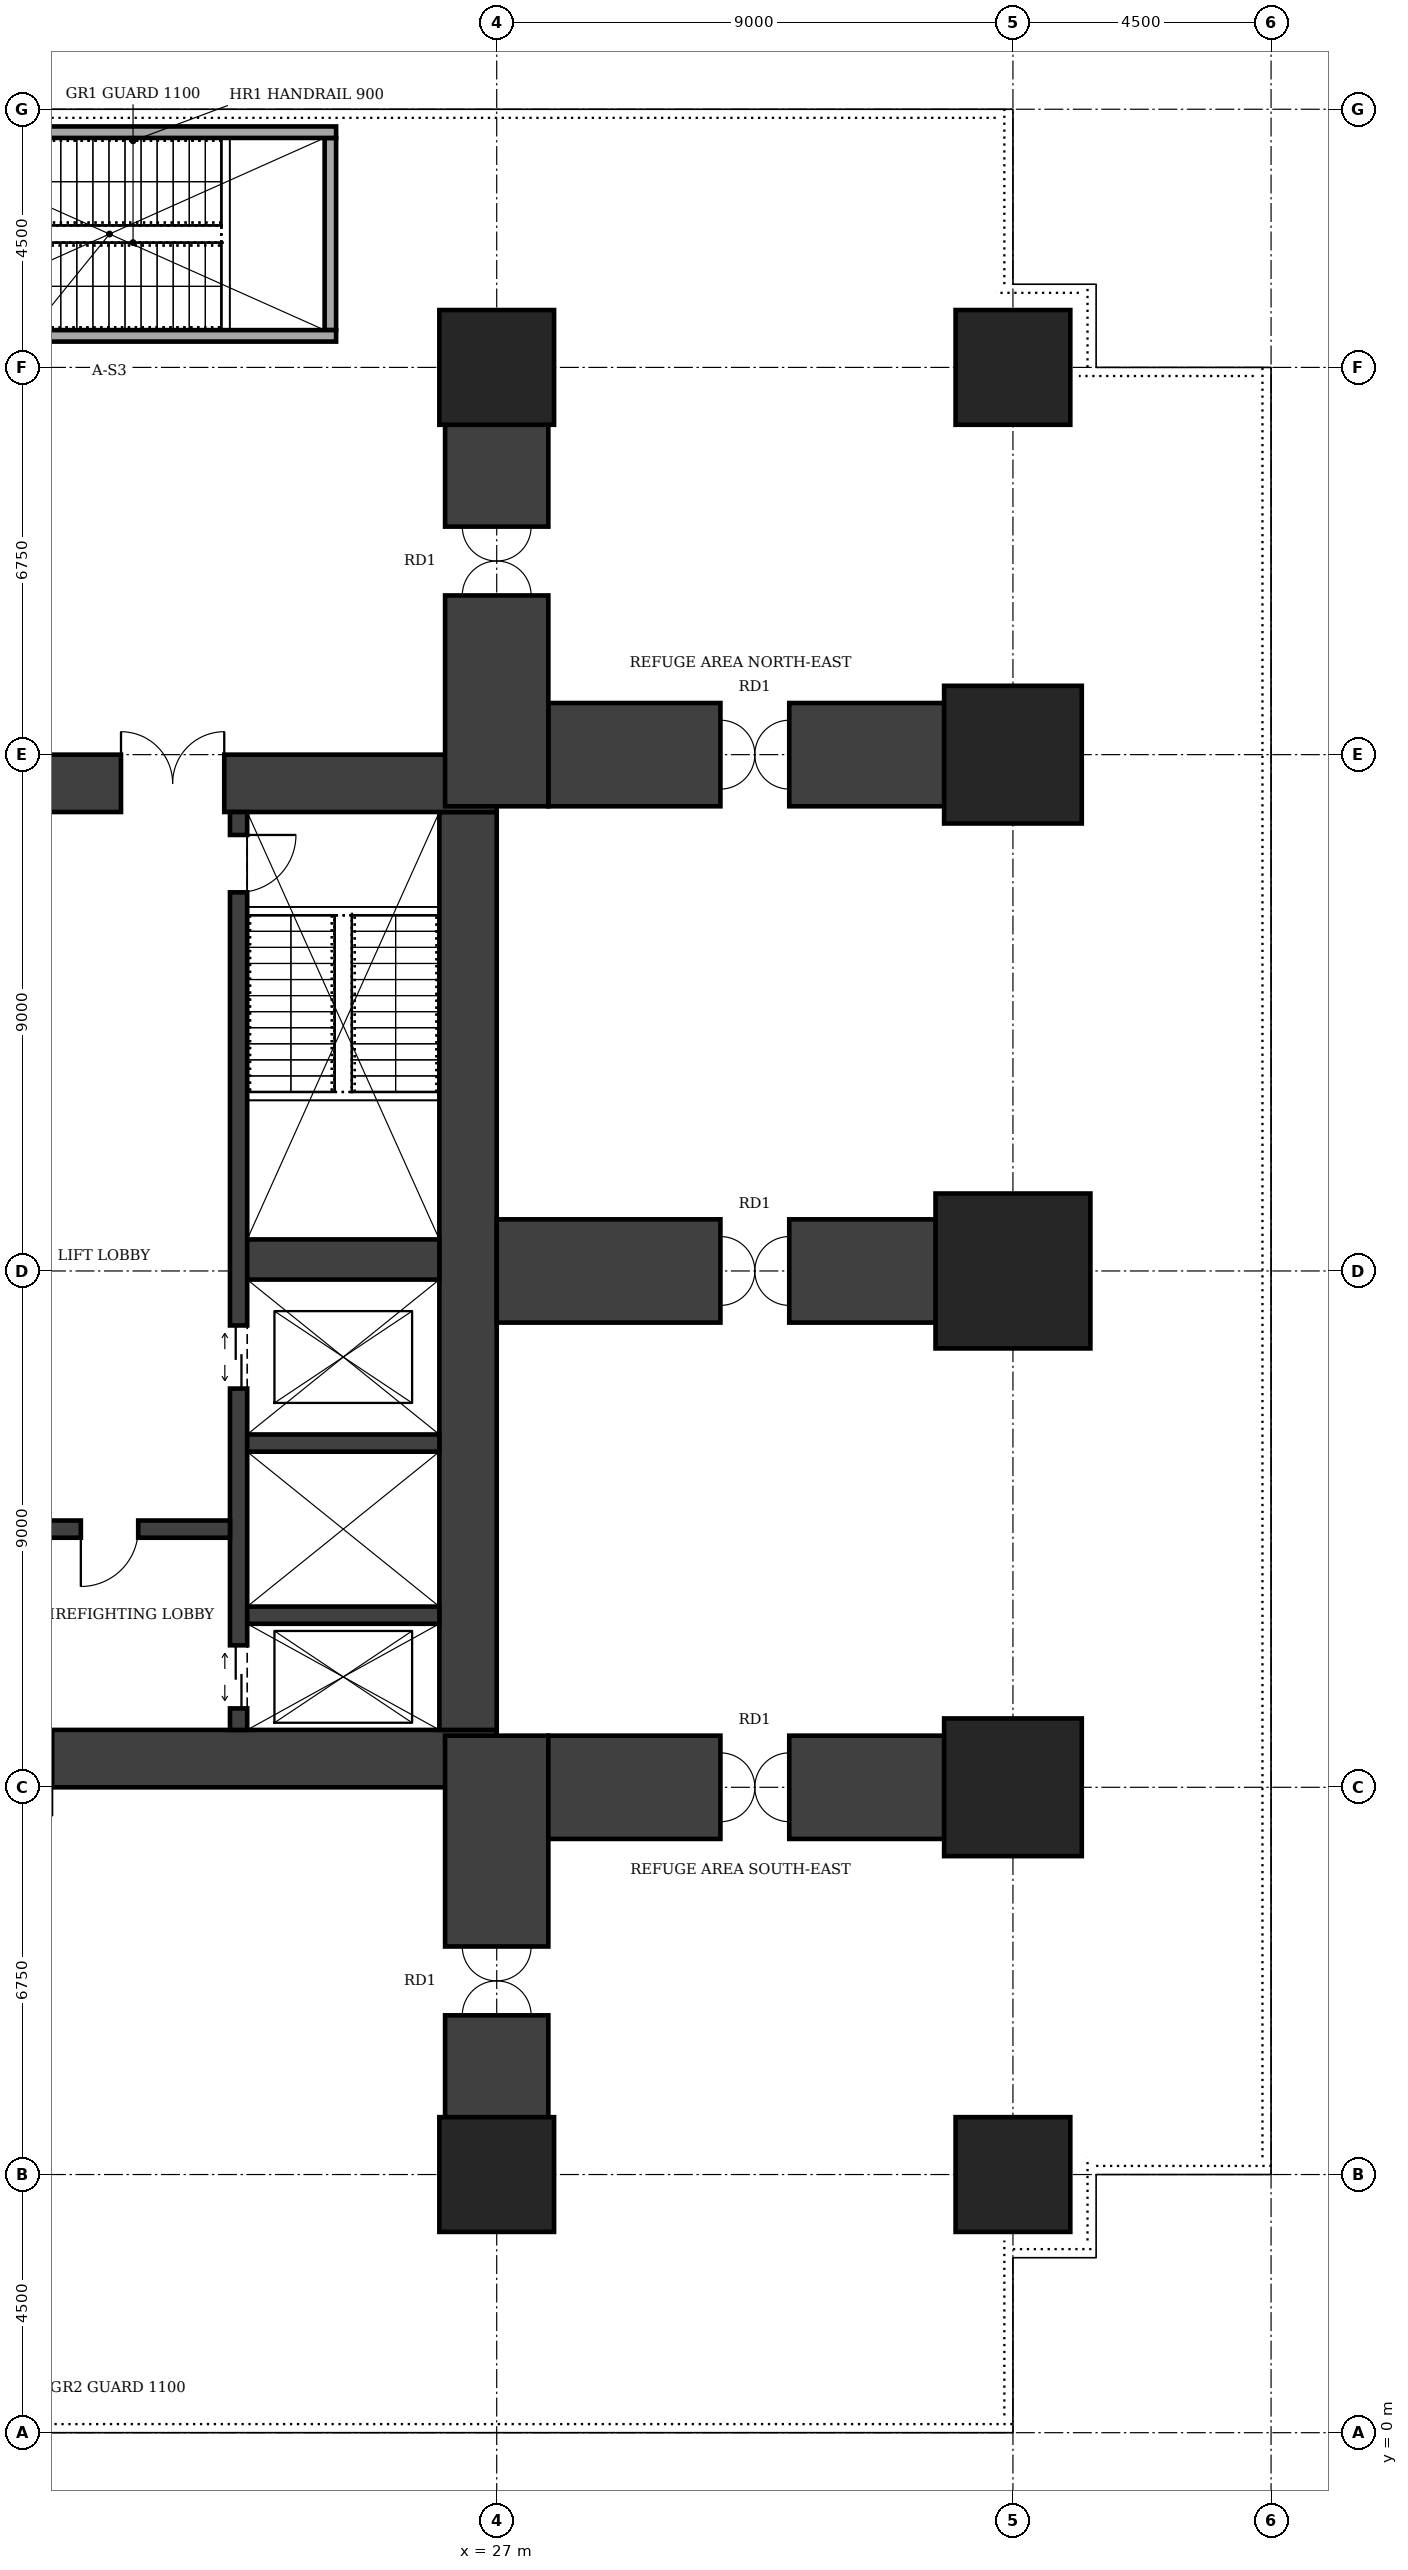
"""IFC4 building model, lengths in metres.
Left out: names, types, materials, properties, quantities, classifications, styles, units other than length and angle.
Written with IfcOpenShell. Run it as: python <this file> out.ifc"""

import sys

from ifc_helpers import new_model, si_unit, direction, frame, frame_2d, origin, origin_2d, place, context, subcontext, project, spatial, rectangle, extrude, element, fill, save


model = new_model("IFC4")
c1 = context("Model", 3, precision=1e-05, world=origin(), true_north=direction((0.0, 1.0)))
c2 = subcontext(c1, "Body", "Model", "MODEL_VIEW")
j1 = project(units=[si_unit("LENGTHUNIT", "METRE"), si_unit("PLANEANGLEUNIT", "RADIAN")], contexts=[c1])
p1 = place(None, origin())
s1 = spatial("IfcSite", under=j1, at=p1, CompositionType="ELEMENT")
p2 = place(p1, origin())
s2 = spatial("IfcBuilding", under=s1, at=p2, CompositionType="ELEMENT")
p3 = place(p2, frame((0.0, 0.0, 77.0)))
s3 = spatial("IfcBuildingStorey", under=s2, at=p3, CompositionType="ELEMENT", Elevation=77.0)
p4 = place(p3, frame((13.5, 11.75, 0.0), z_axis=(0.0, 0.0, 1.0), x_axis=(1.0, 0.0, 0.0)))
e1 = element("IfcWall", 1, at=p4, inside=s3, PredefinedType="SHEAR", context=c2, shape_type="SweptSolid", body=[
    extrude(rectangle(XDim=13.5, YDim=1.0, at=frame_2d((6.75, 0.0))), origin(), (0.0, 0.0, 1.0), 8.0),
])
p5 = place(p4, frame((4.75, 0.0, 0.0)))
e2 = element("IfcOpeningElement", 2, at=p5, cuts=e1, PredefinedType="OPENING", context=c2, shape_type="SweptSolid", body=[
    extrude(rectangle(XDim=1.0, YDim=2.1, at=frame_2d((0.5, 1.05))), frame((0.0, 0.51, 0.0), z_axis=(0.0, -1.0, 0.0), x_axis=(1.0, 0.0, 0.0)), (0.0, 0.0, 1.0), 1.02),
])
p6 = place(p3, frame((26.5, 12.25, 0.0), z_axis=(0.0, 0.0, 1.0), x_axis=(0.0, 1.0, 0.0)))
e3 = element("IfcWall", 3, at=p6, inside=s3, PredefinedType="SHEAR", context=c2, shape_type="SweptSolid", body=[
    extrude(rectangle(XDim=16.0, YDim=1.0, at=frame_2d((8.0, 0.0))), origin(), (0.0, 0.0, 1.0), 8.0),
])
p7 = place(p3, frame((27.0, 28.75, 0.0), z_axis=(0.0, 0.0, 1.0), x_axis=(-1.0, 0.0, 0.0)))
e4 = element("IfcWall", 4, at=p7, inside=s3, PredefinedType="SHEAR", context=c2, shape_type="SweptSolid", body=[
    extrude(rectangle(XDim=13.5, YDim=1.0, at=frame_2d((6.75, 0.0))), origin(), (0.0, 0.0, 1.0), 8.0),
])
p8 = place(p7, frame((4.75, 0.0, 0.0)))
e5 = element("IfcOpeningElement", 5, at=p8, cuts=e4, PredefinedType="OPENING", context=c2, shape_type="SweptSolid", body=[
    extrude(rectangle(XDim=1.8, YDim=2.1, at=frame_2d((0.9, 1.05))), frame((0.0, 0.51, 0.0), z_axis=(0.0, -1.0, 0.0), x_axis=(1.0, 0.0, 0.0)), (0.0, 0.0, 1.0), 1.02),
])
p9 = place(p3, frame((22.5, 12.25, 0.0), z_axis=(0.0, 0.0, 1.0), x_axis=(0.0, 1.0, 0.0)))
e6 = element("IfcWall", 6, at=p9, inside=s3, PredefinedType="SHEAR", context=c2, shape_type="SweptSolid", body=[
    extrude(rectangle(XDim=16.0, YDim=0.3, at=frame_2d((8.0, 0.0))), origin(), (0.0, 0.0, 1.0), 8.0),
])
p10 = place(p9, frame((14.6, 0.0, 0.0)))
e7 = element("IfcOpeningElement", 7, at=p10, cuts=e6, PredefinedType="OPENING", context=c2, shape_type="SweptSolid", body=[
    extrude(rectangle(XDim=1.0, YDim=2.1, at=frame_2d((0.5, 1.05))), frame((0.0, 0.16, 0.0), z_axis=(0.0, -1.0, 0.0), x_axis=(1.0, 0.0, 0.0)), (0.0, 0.0, 1.0), 0.32),
])
p11 = place(p9, frame((0.375, 0.0, 0.0)))
e8 = element("IfcOpeningElement", 8, at=p11, cuts=e6, PredefinedType="OPENING", context=c2, shape_type="SweptSolid", body=[
    extrude(rectangle(XDim=1.1, YDim=2.1, at=frame_2d((0.55, 1.05))), frame((0.0, 0.16, 0.0), z_axis=(0.0, -1.0, 0.0), x_axis=(1.0, 0.0, 0.0)), (0.0, 0.0, 1.0), 0.32),
])
p12 = place(p9, frame((5.95, 0.0, 0.0)))
e9 = element("IfcOpeningElement", 9, at=p12, cuts=e6, PredefinedType="OPENING", context=c2, shape_type="SweptSolid", body=[
    extrude(rectangle(XDim=1.1, YDim=2.1, at=frame_2d((0.55, 1.05))), frame((0.0, 0.16, 0.0), z_axis=(0.0, -1.0, 0.0), x_axis=(1.0, 0.0, 0.0)), (0.0, 0.0, 1.0), 0.32),
])
p13 = place(p3, frame((18.15, 15.75, 0.0), z_axis=(0.0, 0.0, 1.0), x_axis=(1.0, 0.0, 0.0)))
e10 = element("IfcWall", 10, at=p13, inside=s3, PredefinedType="SHEAR", context=c2, shape_type="SweptSolid", body=[
    extrude(rectangle(XDim=4.2, YDim=0.3, at=frame_2d((2.1, 0.0))), origin(), (0.0, 0.0, 1.0), 8.0),
])
p14 = place(p13, frame((1.6, 0.0, 0.0)))
e11 = element("IfcOpeningElement", 11, at=p14, cuts=e10, PredefinedType="OPENING", context=c2, shape_type="SweptSolid", body=[
    extrude(rectangle(XDim=1.0, YDim=2.1, at=frame_2d((0.5, 1.05))), frame((0.0, 0.16, 0.0), z_axis=(0.0, -1.0, 0.0), x_axis=(1.0, 0.0, 0.0)), (0.0, 0.0, 1.0), 0.32),
])
for number, where, z_axis, x_axis in (
    (12, (22.65, 14.25, 0.0), (0.0, 0.0, 1.0), (1.0, 0.0, 0.0)),
    (13, (22.65, 17.25, 0.0), (0.0, 0.0, 1.0), (1.0, 0.0, 0.0)),
):
    element("IfcWall", number, at=place(p3, frame(where, z_axis=z_axis, x_axis=x_axis)), inside=s3, PredefinedType="SHEAR", context=c2, shape_type="SweptSolid", body=[
        extrude(rectangle(XDim=3.35, YDim=0.3, at=frame_2d((1.675, 0.0))), origin(), (0.0, 0.0, 1.0), 8.0),
    ])
p15 = place(p3, frame((22.65, 20.45, 0.0), z_axis=(0.0, 0.0, 1.0), x_axis=(1.0, 0.0, 0.0)))
e14 = element("IfcWall", 14, at=p15, inside=s3, PredefinedType="SHEAR", context=c2, shape_type="SweptSolid", body=[
    extrude(rectangle(XDim=3.35, YDim=0.7, at=frame_2d((1.675, 0.0))), origin(), (0.0, 0.0, 1.0), 8.0),
])
for number, where, z_axis, x_axis in (
    (15, (27.0, 4.5, 0.0), (0.0, 0.0, 1.0), (1.0, 0.0, 0.0)),
    (16, (36.0, 4.5, 0.0), (0.0, 0.0, 1.0), (1.0, 0.0, 0.0)),
):
    element("IfcColumn", number, at=place(p3, frame(where, z_axis=z_axis, x_axis=x_axis)), inside=s3, PredefinedType="COLUMN", context=c2, shape_type="SweptSolid", body=[
        extrude(rectangle(XDim=2.0, YDim=2.0, at=origin_2d()), origin(), (0.0, 0.0, 1.0), 8.0),
    ])
p16 = place(p3, frame((36.0, 11.25, 0.0), z_axis=(0.0, 0.0, 1.0), x_axis=(1.0, 0.0, 0.0)))
e17 = element("IfcColumn", 17, at=p16, inside=s3, PredefinedType="COLUMN", context=c2, shape_type="SweptSolid", body=[
    extrude(rectangle(XDim=2.4, YDim=2.4, at=origin_2d()), origin(), (0.0, 0.0, 1.0), 8.0),
])
p17 = place(p3, frame((36.0, 20.25, 0.0), z_axis=(0.0, 0.0, 1.0), x_axis=(1.0, 0.0, 0.0)))
e18 = element("IfcColumn", 18, at=p17, inside=s3, PredefinedType="COLUMN", context=c2, shape_type="SweptSolid", body=[
    extrude(rectangle(XDim=2.7, YDim=2.7, at=origin_2d()), origin(), (0.0, 0.0, 1.0), 8.0),
])
p18 = place(p3, frame((36.0, 29.25, 0.0), z_axis=(0.0, 0.0, 1.0), x_axis=(1.0, 0.0, 0.0)))
e19 = element("IfcColumn", 19, at=p18, inside=s3, PredefinedType="COLUMN", context=c2, shape_type="SweptSolid", body=[
    extrude(rectangle(XDim=2.4, YDim=2.4, at=origin_2d()), origin(), (0.0, 0.0, 1.0), 8.0),
])
for number, where, z_axis, x_axis in (
    (20, (27.0, 36.0, 0.0), (0.0, 0.0, 1.0), (1.0, 0.0, 0.0)),
    (21, (36.0, 36.0, 0.0), (0.0, 0.0, 1.0), (1.0, 0.0, 0.0)),
):
    element("IfcColumn", number, at=place(p3, frame(where, z_axis=z_axis, x_axis=x_axis)), inside=s3, PredefinedType="COLUMN", context=c2, shape_type="SweptSolid", body=[
        extrude(rectangle(XDim=2.0, YDim=2.0, at=origin_2d()), origin(), (0.0, 0.0, 1.0), 8.0),
    ])
p19 = place(p3, frame((27.0, 4.5, 0.0), z_axis=(0.0, 0.0, 1.0), x_axis=(0.0, 1.0, 0.0)))
e22 = element("IfcWall", 22, at=p19, inside=s3, PredefinedType="SHEAR", context=c2, shape_type="SweptSolid", body=[
    extrude(rectangle(XDim=7.65, YDim=1.8, at=frame_2d((3.825, 0.0))), origin(), (0.0, 0.0, 1.0), 8.0),
])
p20 = place(p19, frame((2.775, 0.0, 0.0)))
e23 = element("IfcOpeningElement", 23, at=p20, cuts=e22, PredefinedType="OPENING", context=c2, shape_type="SweptSolid", body=[
    extrude(rectangle(XDim=1.2, YDim=2.1, at=frame_2d((0.6, 1.05))), frame((0.0, 0.91, 0.0), z_axis=(0.0, -1.0, 0.0), x_axis=(1.0, 0.0, 0.0)), (0.0, 0.0, 1.0), 1.82),
])
p21 = place(p3, frame((27.0, 28.35, 0.0), z_axis=(0.0, 0.0, 1.0), x_axis=(0.0, 1.0, 0.0)))
e24 = element("IfcWall", 24, at=p21, inside=s3, PredefinedType="SHEAR", context=c2, shape_type="SweptSolid", body=[
    extrude(rectangle(XDim=7.65, YDim=1.8, at=frame_2d((3.825, 0.0))), origin(), (0.0, 0.0, 1.0), 8.0),
])
p22 = place(p21, frame((3.675, 0.0, 0.0)))
e25 = element("IfcOpeningElement", 25, at=p22, cuts=e24, PredefinedType="OPENING", context=c2, shape_type="SweptSolid", body=[
    extrude(rectangle(XDim=1.2, YDim=2.1, at=frame_2d((0.6, 1.05))), frame((0.0, 0.91, 0.0), z_axis=(0.0, -1.0, 0.0), x_axis=(1.0, 0.0, 0.0)), (0.0, 0.0, 1.0), 1.82),
])
p23 = place(p3, frame((27.0, 20.25, 0.0), z_axis=(0.0, 0.0, 1.0), x_axis=(1.0, 0.0, 0.0)))
e26 = element("IfcWall", 26, at=p23, inside=s3, PredefinedType="SHEAR", context=c2, shape_type="SweptSolid", body=[
    extrude(rectangle(XDim=9.0, YDim=1.8, at=frame_2d((4.5, 0.0))), origin(), (0.0, 0.0, 1.0), 8.0),
])
p24 = place(p23, frame((3.9, 0.0, 0.0)))
e27 = element("IfcOpeningElement", 27, at=p24, cuts=e26, PredefinedType="OPENING", context=c2, shape_type="SweptSolid", body=[
    extrude(rectangle(XDim=1.2, YDim=2.1, at=frame_2d((0.6, 1.05))), frame((0.0, 0.91, 0.0), z_axis=(0.0, -1.0, 0.0), x_axis=(1.0, 0.0, 0.0)), (0.0, 0.0, 1.0), 1.82),
])
p25 = place(p3, frame((27.9, 11.25, 0.0), z_axis=(0.0, 0.0, 1.0), x_axis=(1.0, 0.0, 0.0)))
e28 = element("IfcWall", 28, at=p25, inside=s3, PredefinedType="SHEAR", context=c2, shape_type="SweptSolid", body=[
    extrude(rectangle(XDim=8.1, YDim=1.8, at=frame_2d((4.05, 0.0))), origin(), (0.0, 0.0, 1.0), 8.0),
])
p26 = place(p25, frame((3.0, 0.0, 0.0)))
e29 = element("IfcOpeningElement", 29, at=p26, cuts=e28, PredefinedType="OPENING", context=c2, shape_type="SweptSolid", body=[
    extrude(rectangle(XDim=1.2, YDim=2.1, at=frame_2d((0.6, 1.05))), frame((0.0, 0.91, 0.0), z_axis=(0.0, -1.0, 0.0), x_axis=(1.0, 0.0, 0.0)), (0.0, 0.0, 1.0), 1.82),
])
p27 = place(p3, frame((27.9, 29.25, 0.0), z_axis=(0.0, 0.0, 1.0), x_axis=(1.0, 0.0, 0.0)))
e30 = element("IfcWall", 30, at=p27, inside=s3, PredefinedType="SHEAR", context=c2, shape_type="SweptSolid", body=[
    extrude(rectangle(XDim=8.1, YDim=1.8, at=frame_2d((4.05, 0.0))), origin(), (0.0, 0.0, 1.0), 8.0),
])
p28 = place(p27, frame((3.0, 0.0, 0.0)))
e31 = element("IfcOpeningElement", 31, at=p28, cuts=e30, PredefinedType="OPENING", context=c2, shape_type="SweptSolid", body=[
    extrude(rectangle(XDim=1.2, YDim=2.1, at=frame_2d((0.6, 1.05))), frame((0.0, 0.91, 0.0), z_axis=(0.0, -1.0, 0.0), x_axis=(1.0, 0.0, 0.0)), (0.0, 0.0, 1.0), 1.82),
])
for number, where, z_axis, x_axis in (
    (32, (16.3, 36.55, 0.0), (0.0, 0.0, 1.0), (1.0, 0.0, 0.0)),
    (33, (16.3, 40.1, 0.0), (0.0, 0.0, 1.0), (1.0, 0.0, 0.0)),
):
    element("IfcWall", number, at=place(p3, frame(where, z_axis=z_axis, x_axis=x_axis)), inside=s3, PredefinedType="SOLIDWALL", context=c2, shape_type="SweptSolid", body=[
        extrude(rectangle(XDim=7.9, YDim=0.2, at=frame_2d((3.95, 0.0))), origin(), (0.0, 0.0, 1.0), 7.75),
    ])
p29 = place(p3, frame((24.1, 36.65, 0.0), z_axis=(0.0, 0.0, 1.0), x_axis=(0.0, 1.0, 0.0)))
e34 = element("IfcWall", 34, at=p29, inside=s3, PredefinedType="SOLIDWALL", context=c2, shape_type="SweptSolid", body=[
    extrude(rectangle(XDim=3.35, YDim=0.2, at=frame_2d((1.675, 0.0))), origin(), (0.0, 0.0, 1.0), 7.75),
])
p30 = place(p8, frame((1.8, 0.0, 0.0), z_axis=(0.0, 0.0, 1.0), x_axis=(-1.0, 0.0, 0.0)))
e35 = element("IfcDoor", 35, at=p30, inside=s3, OperationType="DOUBLE_DOOR_SINGLE_SWING", PredefinedType="DOOR", context=c2, shape_type="SweptSolid", body=[
    extrude(rectangle(XDim=1.8, YDim=2.1, at=frame_2d((0.9, 1.05))), frame((0.0, 0.025, 0.0), z_axis=(0.0, -1.0, 0.0), x_axis=(1.0, 0.0, 0.0)), (0.0, 0.0, 1.0), 0.05),
])
fill(e5, e35)
p31 = place(p14, frame((1.0, 0.0, 0.0), z_axis=(0.0, 0.0, 1.0), x_axis=(-1.0, 0.0, 0.0)))
e36 = element("IfcDoor", 36, at=p31, inside=s3, OperationType="SINGLE_SWING_RIGHT", PredefinedType="DOOR", context=c2, shape_type="SweptSolid", body=[
    extrude(rectangle(XDim=1.0, YDim=2.1, at=frame_2d((0.5, 1.05))), frame((0.0, 0.025, 0.0), z_axis=(0.0, -1.0, 0.0), x_axis=(1.0, 0.0, 0.0)), (0.0, 0.0, 1.0), 0.05),
])
fill(e11, e36)
p32 = place(p10, frame((1.0, 0.0, 0.0), z_axis=(0.0, 0.0, 1.0), x_axis=(-1.0, 0.0, 0.0)))
e37 = element("IfcDoor", 37, at=p32, inside=s3, OperationType="SINGLE_SWING_LEFT", PredefinedType="DOOR", context=c2, shape_type="SweptSolid", body=[
    extrude(rectangle(XDim=1.0, YDim=2.1, at=frame_2d((0.5, 1.05))), frame((0.0, 0.025, 0.0), z_axis=(0.0, -1.0, 0.0), x_axis=(1.0, 0.0, 0.0)), (0.0, 0.0, 1.0), 0.05),
])
fill(e7, e37)
p33 = place(p11, origin())
e38 = element("IfcDoor", 38, at=p33, inside=s3, OperationType="DOUBLE_DOOR_SLIDING", PredefinedType="DOOR", context=c2, shape_type="SweptSolid", body=[
    extrude(rectangle(XDim=1.1, YDim=2.1, at=frame_2d((0.55, 1.05))), frame((0.0, 0.025, 0.0), z_axis=(0.0, -1.0, 0.0), x_axis=(1.0, 0.0, 0.0)), (0.0, 0.0, 1.0), 0.05),
])
fill(e8, e38)
p34 = place(p12, origin())
e39 = element("IfcDoor", 39, at=p34, inside=s3, OperationType="DOUBLE_DOOR_SLIDING", PredefinedType="DOOR", context=c2, shape_type="SweptSolid", body=[
    extrude(rectangle(XDim=1.1, YDim=2.1, at=frame_2d((0.55, 1.05))), frame((0.0, 0.025, 0.0), z_axis=(0.0, -1.0, 0.0), x_axis=(1.0, 0.0, 0.0)), (0.0, 0.0, 1.0), 0.05),
])
fill(e9, e39)
p35 = place(p20, origin())
e40 = element("IfcDoor", 40, at=p35, inside=s3, OperationType="DOUBLE_DOOR_DOUBLE_SWING", PredefinedType="DOOR", context=c2, shape_type="SweptSolid", body=[
    extrude(rectangle(XDim=1.2, YDim=2.1, at=frame_2d((0.6, 1.05))), frame((0.0, 0.025, 0.0), z_axis=(0.0, -1.0, 0.0), x_axis=(1.0, 0.0, 0.0)), (0.0, 0.0, 1.0), 0.05),
])
fill(e23, e40)
p36 = place(p22, origin())
e41 = element("IfcDoor", 41, at=p36, inside=s3, OperationType="DOUBLE_DOOR_DOUBLE_SWING", PredefinedType="DOOR", context=c2, shape_type="SweptSolid", body=[
    extrude(rectangle(XDim=1.2, YDim=2.1, at=frame_2d((0.6, 1.05))), frame((0.0, 0.025, 0.0), z_axis=(0.0, -1.0, 0.0), x_axis=(1.0, 0.0, 0.0)), (0.0, 0.0, 1.0), 0.05),
])
fill(e25, e41)
p37 = place(p24, origin())
e42 = element("IfcDoor", 42, at=p37, inside=s3, OperationType="DOUBLE_DOOR_DOUBLE_SWING", PredefinedType="DOOR", context=c2, shape_type="SweptSolid", body=[
    extrude(rectangle(XDim=1.2, YDim=2.1, at=frame_2d((0.6, 1.05))), frame((0.0, 0.025, 0.0), z_axis=(0.0, -1.0, 0.0), x_axis=(1.0, 0.0, 0.0)), (0.0, 0.0, 1.0), 0.05),
])
fill(e27, e42)
p38 = place(p26, origin())
e43 = element("IfcDoor", 43, at=p38, inside=s3, OperationType="DOUBLE_DOOR_DOUBLE_SWING", PredefinedType="DOOR", context=c2, shape_type="SweptSolid", body=[
    extrude(rectangle(XDim=1.2, YDim=2.1, at=frame_2d((0.6, 1.05))), frame((0.0, 0.025, 0.0), z_axis=(0.0, -1.0, 0.0), x_axis=(1.0, 0.0, 0.0)), (0.0, 0.0, 1.0), 0.05),
])
fill(e29, e43)
p39 = place(p28, origin())
e44 = element("IfcDoor", 44, at=p39, inside=s3, OperationType="DOUBLE_DOOR_DOUBLE_SWING", PredefinedType="DOOR", context=c2, shape_type="SweptSolid", body=[
    extrude(rectangle(XDim=1.2, YDim=2.1, at=frame_2d((0.6, 1.05))), frame((0.0, 0.025, 0.0), z_axis=(0.0, -1.0, 0.0), x_axis=(1.0, 0.0, 0.0)), (0.0, 0.0, 1.0), 0.05),
])
fill(e31, e44)
save(model, sys.argv[1])
